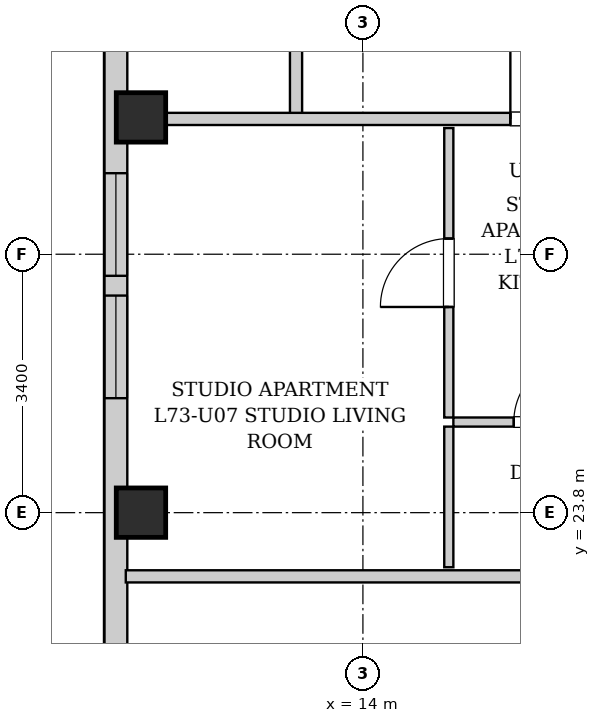
"""IFC4 building model, lengths in metres.
Left out: names, types, materials, properties, quantities, classifications, styles, units other than length and angle.
Written with IfcOpenShell. Run it as: python <this file> out.ifc"""

import sys

from ifc_helpers import new_model, si_unit, direction, frame, frame_2d, origin, origin_2d, place, context, subcontext, project, spatial, rectangle, extrude, element, fill, save


model = new_model("IFC4")
c1 = context("Model", 3, precision=1e-05, world=origin(), true_north=direction((0.0, 1.0)))
c2 = subcontext(c1, "Body", "Model", "MODEL_VIEW")
j1 = project(units=[si_unit("LENGTHUNIT", "METRE"), si_unit("PLANEANGLEUNIT", "RADIAN")], contexts=[c1])
p1 = place(None, origin())
s1 = spatial("IfcSite", under=j1, at=p1, CompositionType="ELEMENT")
p2 = place(p1, origin())
s2 = spatial("IfcBuilding", under=s1, at=p2, CompositionType="ELEMENT")
p3 = place(p2, frame((0.0, 0.0, 251.3)))
s3 = spatial("IfcBuildingStorey", under=s2, at=p3, CompositionType="ELEMENT", Elevation=251.3)
for number, where, z_axis, x_axis in (
    (1, (11.08, 23.8, 0.0), (0.0, 0.0, 1.0), (1.0, 0.0, 0.0)),
    (2, (11.08, 29.0, 0.0), (0.0, 0.0, 1.0), (1.0, 0.0, 0.0)),
):
    element("IfcColumn", number, at=place(p3, frame(where, z_axis=z_axis, x_axis=x_axis)), inside=s3, PredefinedType="COLUMN", context=c2, shape_type="SweptSolid", body=[
        extrude(rectangle(XDim=0.65, YDim=0.65, at=origin_2d()), origin(), (0.0, 0.0, 1.0), 3.4),
    ])
p4 = place(p3, frame((10.75, 6.3, 0.0), z_axis=(0.0, 0.0, 1.0), x_axis=(0.0, 1.0, 0.0)))
e3 = element("IfcWall", 3, at=p4, inside=s3, PredefinedType="SOLIDWALL", context=c2, shape_type="SweptSolid", body=[
    extrude(rectangle(XDim=31.4, YDim=0.3, at=frame_2d((15.7, 0.0))), origin(), (0.0, 0.0, 1.0), 3.14),
])
p5 = place(p4, frame((28.546, 0.0, 0.55)))
e4 = element("IfcOpeningElement", 4, at=p5, cuts=e3, PredefinedType="OPENING", context=c2, shape_type="SweptSolid", body=[
    extrude(rectangle(XDim=1.35, YDim=1.2, at=frame_2d((0.675, 0.6))), frame((0.0, 0.16, 0.0), z_axis=(0.0, -1.0, 0.0), x_axis=(1.0, 0.0, 0.0)), (0.0, 0.0, 1.0), 0.32),
])
p6 = place(p4, frame((11.85, 0.0, 0.55)))
e5 = element("IfcOpeningElement", 5, at=p6, cuts=e3, PredefinedType="OPENING", context=c2, shape_type="SweptSolid", body=[
    extrude(rectangle(XDim=1.35, YDim=1.2, at=frame_2d((0.675, 0.6))), frame((0.0, 0.16, 0.0), z_axis=(0.0, -1.0, 0.0), x_axis=(1.0, 0.0, 0.0)), (0.0, 0.0, 1.0), 0.32),
])
p7 = place(p4, frame((9.185, 0.0, 0.55)))
e6 = element("IfcOpeningElement", 6, at=p7, cuts=e3, PredefinedType="OPENING", context=c2, shape_type="SweptSolid", body=[
    extrude(rectangle(XDim=1.35, YDim=1.2, at=frame_2d((0.675, 0.6))), frame((0.0, 0.16, 0.0), z_axis=(0.0, -1.0, 0.0), x_axis=(1.0, 0.0, 0.0)), (0.0, 0.0, 1.0), 0.32),
])
p8 = place(p4, frame((19.006, 0.0, 0.55)))
e7 = element("IfcOpeningElement", 7, at=p8, cuts=e3, PredefinedType="OPENING", context=c2, shape_type="SweptSolid", body=[
    extrude(rectangle(XDim=1.35, YDim=1.2, at=frame_2d((0.675, 0.6))), frame((0.0, 0.16, 0.0), z_axis=(0.0, -1.0, 0.0), x_axis=(1.0, 0.0, 0.0)), (0.0, 0.0, 1.0), 0.32),
])
p9 = place(p4, frame((20.616, 0.0, 0.55)))
e8 = element("IfcOpeningElement", 8, at=p9, cuts=e3, PredefinedType="OPENING", context=c2, shape_type="SweptSolid", body=[
    extrude(rectangle(XDim=1.35, YDim=1.2, at=frame_2d((0.675, 0.6))), frame((0.0, 0.16, 0.0), z_axis=(0.0, -1.0, 0.0), x_axis=(1.0, 0.0, 0.0)), (0.0, 0.0, 1.0), 0.32),
])
p10 = place(p3, frame((13.12, 28.98, 0.0), z_axis=(0.0, 0.0, 1.0), x_axis=(0.0, 1.0, 0.0)))
e9 = element("IfcWall", 9, at=p10, inside=s3, PredefinedType="PARTITIONING", context=c2, shape_type="SweptSolid", body=[
    extrude(rectangle(XDim=1.58, YDim=0.16, at=frame_2d((0.79, 0.0))), origin(), (0.0, 0.0, 1.0), 3.14),
])
p11 = place(p3, frame((10.88, 22.962, 0.0), z_axis=(0.0, 0.0, 1.0), x_axis=(1.0, 0.0, 0.0)))
e10 = element("IfcWall", 10, at=p11, inside=s3, PredefinedType="PARTITIONING", context=c2, shape_type="SweptSolid", body=[
    extrude(rectangle(XDim=6.76, YDim=0.16, at=frame_2d((3.38, 0.0))), origin(), (0.0, 0.0, 1.0), 3.14),
])
p12 = place(p3, frame((10.88, 28.98, 0.0), z_axis=(0.0, 0.0, 1.0), x_axis=(1.0, 0.0, 0.0)))
e11 = element("IfcWall", 11, at=p12, inside=s3, PredefinedType="PARTITIONING", context=c2, shape_type="SweptSolid", body=[
    extrude(rectangle(XDim=6.88, YDim=0.16, at=frame_2d((3.44, 0.0))), origin(), (0.0, 0.0, 1.0), 2.668),
])
p13 = place(p12, frame((5.06, 0.0, 0.0)))
e12 = element("IfcOpeningElement", 12, at=p13, cuts=e11, PredefinedType="OPENING", context=c2, shape_type="SweptSolid", body=[
    extrude(rectangle(XDim=0.95, YDim=2.1, at=frame_2d((0.475, 1.05))), frame((0.0, 0.09, 0.0), z_axis=(0.0, -1.0, 0.0), x_axis=(1.0, 0.0, 0.0)), (0.0, 0.0, 1.0), 0.18),
])
p14 = place(p3, frame((15.19, 24.992, 0.0), z_axis=(0.0, 0.0, 1.0), x_axis=(1.0, 0.0, 0.0)))
e13 = element("IfcWall", 13, at=p14, inside=s3, PredefinedType="PARTITIONING", context=c2, shape_type="SweptSolid", body=[
    extrude(rectangle(XDim=2.45, YDim=0.12, at=frame_2d((1.225, 0.0))), origin(), (0.0, 0.0, 1.0), 3.14),
])
p15 = place(p14, frame((0.795, 0.0, 0.0)))
e14 = element("IfcOpeningElement", 14, at=p15, cuts=e13, PredefinedType="OPENING", context=c2, shape_type="SweptSolid", body=[
    extrude(rectangle(XDim=0.86, YDim=2.05, at=frame_2d((0.43, 1.025))), frame((0.0, 0.07, 0.0), z_axis=(0.0, -1.0, 0.0), x_axis=(1.0, 0.0, 0.0)), (0.0, 0.0, 1.0), 0.14),
])
p16 = place(p3, frame((15.13, 23.082, 0.0), z_axis=(0.0, 0.0, 1.0), x_axis=(0.0, 1.0, 0.0)))
e15 = element("IfcWall", 15, at=p16, inside=s3, PredefinedType="PARTITIONING", context=c2, shape_type="SweptSolid", body=[
    extrude(rectangle(XDim=1.85, YDim=0.12, at=frame_2d((0.925, 0.0))), origin(), (0.0, 0.0, 1.0), 3.14),
])
p17 = place(p3, frame((15.13, 25.052, 0.0), z_axis=(0.0, 0.0, 1.0), x_axis=(0.0, 1.0, 0.0)))
e16 = element("IfcWall", 16, at=p17, inside=s3, PredefinedType="PARTITIONING", context=c2, shape_type="SweptSolid", body=[
    extrude(rectangle(XDim=3.808, YDim=0.12, at=frame_2d((1.904, 0.0))), origin(), (0.0, 0.0, 1.0), 3.14),
])
p18 = place(p17, frame((1.454, 0.0, 0.0)))
e17 = element("IfcOpeningElement", 17, at=p18, cuts=e16, PredefinedType="OPENING", context=c2, shape_type="SweptSolid", body=[
    extrude(rectangle(XDim=0.9, YDim=2.05, at=frame_2d((0.45, 1.025))), frame((0.0, 0.07, 0.0), z_axis=(0.0, -1.0, 0.0), x_axis=(1.0, 0.0, 0.0)), (0.0, 0.0, 1.0), 0.14),
])
p19 = place(p13, origin())
e18 = element("IfcDoor", 18, at=p19, inside=s3, OperationType="SINGLE_SWING_LEFT", PredefinedType="DOOR", context=c2, shape_type="SweptSolid", body=[
    extrude(rectangle(XDim=0.95, YDim=2.1, at=frame_2d((0.475, 1.05))), frame((0.0, 0.025, 0.0), z_axis=(0.0, -1.0, 0.0), x_axis=(1.0, 0.0, 0.0)), (0.0, 0.0, 1.0), 0.05),
])
fill(e12, e18)
p20 = place(p15, origin())
e19 = element("IfcDoor", 19, at=p20, inside=s3, OperationType="SINGLE_SWING_RIGHT", PredefinedType="DOOR", context=c2, shape_type="SweptSolid", body=[
    extrude(rectangle(XDim=0.86, YDim=2.05, at=frame_2d((0.43, 1.025))), frame((0.0, 0.025, 0.0), z_axis=(0.0, -1.0, 0.0), x_axis=(1.0, 0.0, 0.0)), (0.0, 0.0, 1.0), 0.05),
])
fill(e14, e19)
p21 = place(p18, origin())
e20 = element("IfcDoor", 20, at=p21, inside=s3, OperationType="SINGLE_SWING_LEFT", PredefinedType="DOOR", context=c2, shape_type="SweptSolid", body=[
    extrude(rectangle(XDim=0.9, YDim=2.05, at=frame_2d((0.45, 1.025))), frame((0.0, 0.025, 0.0), z_axis=(0.0, -1.0, 0.0), x_axis=(1.0, 0.0, 0.0)), (0.0, 0.0, 1.0), 0.05),
])
fill(e17, e20)
p22 = place(p8, origin())
e21 = element("IfcWindow", 21, at=p22, inside=s3, PartitioningType="SINGLE_PANEL", PredefinedType="WINDOW", context=c2, shape_type="SweptSolid", body=[
    extrude(rectangle(XDim=1.35, YDim=1.2, at=frame_2d((0.675, 0.6))), frame((0.0, 0.03, 0.0), z_axis=(0.0, -1.0, 0.0), x_axis=(1.0, 0.0, 0.0)), (0.0, 0.0, 1.0), 0.06),
])
fill(e7, e21)
p23 = place(p9, origin())
e22 = element("IfcWindow", 22, at=p23, inside=s3, PartitioningType="SINGLE_PANEL", PredefinedType="WINDOW", context=c2, shape_type="SweptSolid", body=[
    extrude(rectangle(XDim=1.35, YDim=1.2, at=frame_2d((0.675, 0.6))), frame((0.0, 0.03, 0.0), z_axis=(0.0, -1.0, 0.0), x_axis=(1.0, 0.0, 0.0)), (0.0, 0.0, 1.0), 0.06),
])
fill(e8, e22)
save(model, sys.argv[1])
